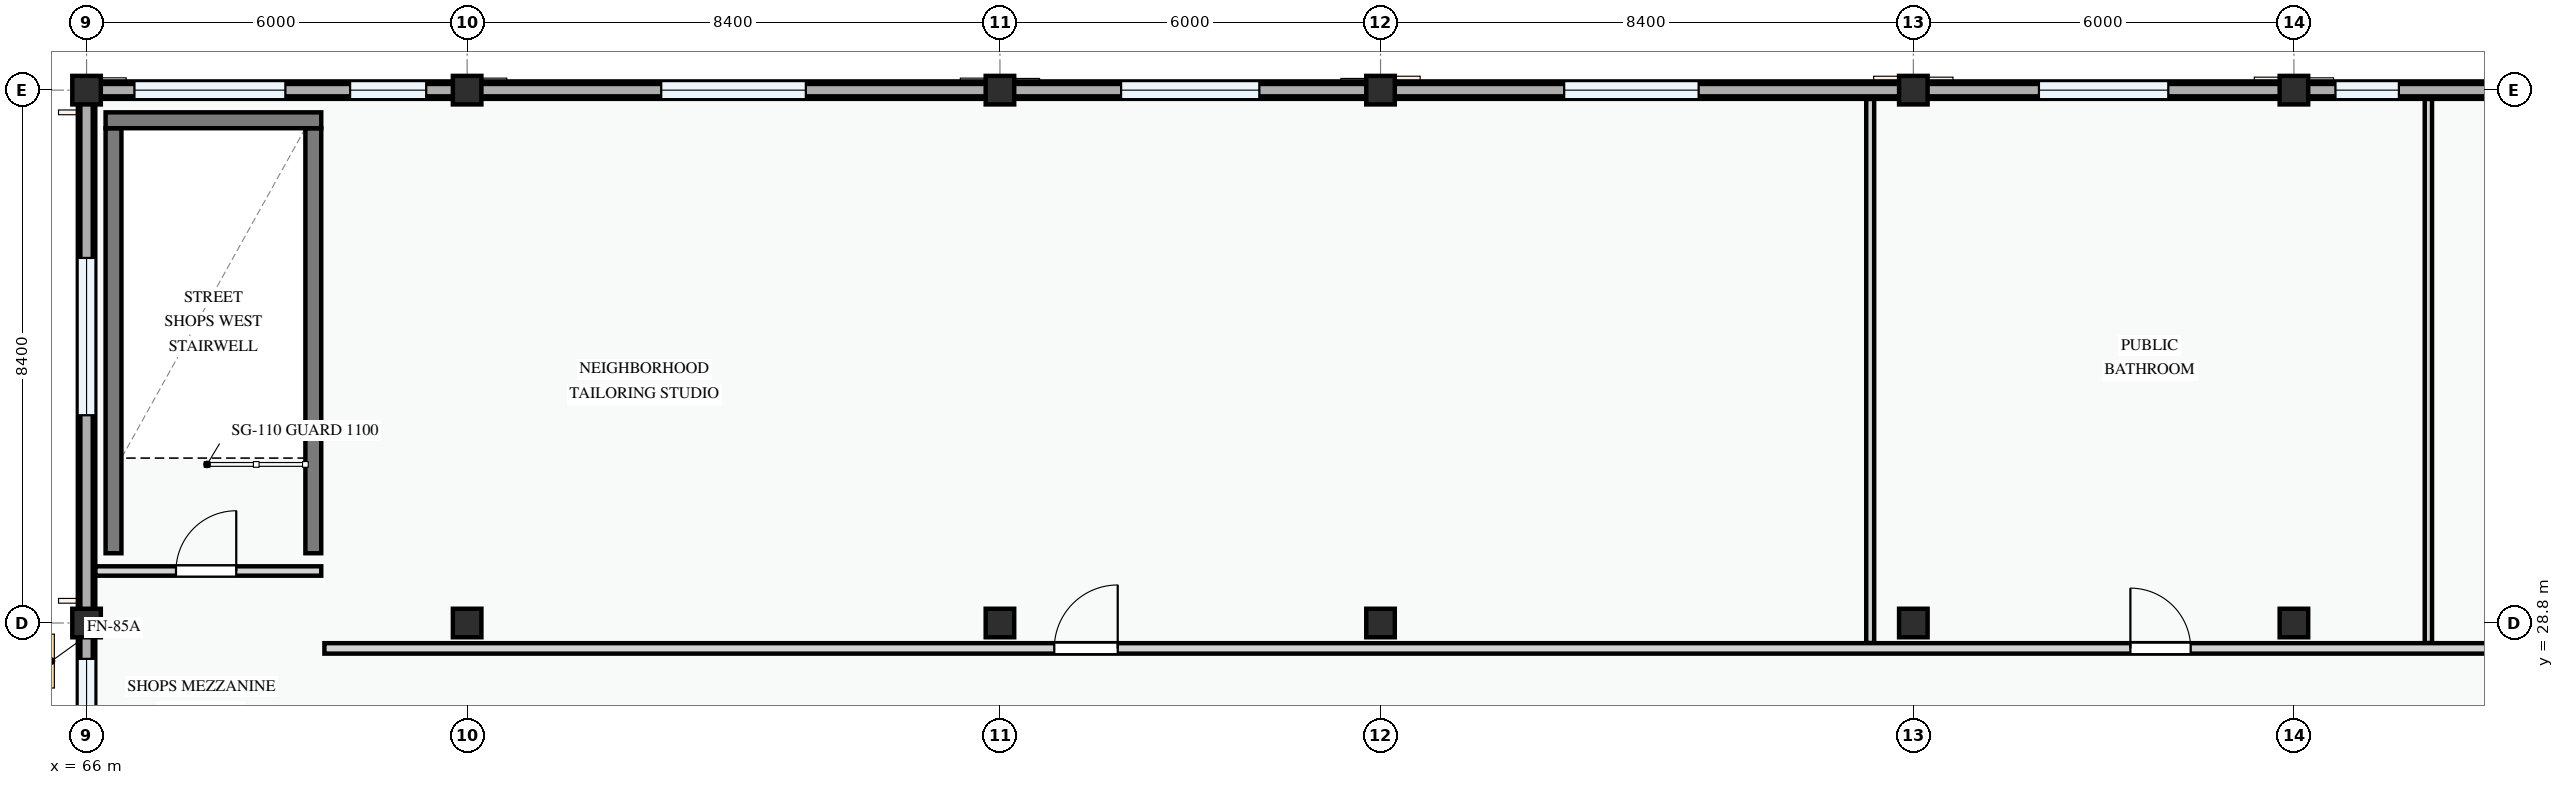
"""IFC4 building model, lengths in metres.
Left out: names, types, materials, properties, quantities, classifications, styles, units other than length and angle.
Written with IfcOpenShell. Run it as: python <this file> out.ifc"""

import sys

from ifc_helpers import new_model, si_unit, direction, frame, frame_2d, origin, origin_2d, place, context, subcontext, project, spatial, rectangle, extrude, element, fill, save


model = new_model("IFC4")
c1 = context("Model", 3, precision=1e-05, world=origin(), true_north=direction((0.0, 1.0)))
c2 = subcontext(c1, "Body", "Model", "MODEL_VIEW")
j1 = project(units=[si_unit("LENGTHUNIT", "METRE"), si_unit("PLANEANGLEUNIT", "RADIAN")], contexts=[c1])
p1 = place(None, origin())
s1 = spatial("IfcSite", under=j1, at=p1, CompositionType="ELEMENT")
p2 = place(p1, origin())
s2 = spatial("IfcBuilding", under=s1, at=p2, CompositionType="ELEMENT")
p3 = place(p2, frame((0.0, 0.0, 4.5)))
s3 = spatial("IfcBuildingStorey", under=s2, at=p3, CompositionType="ELEMENT", Elevation=4.5)
for number, where, z_axis, x_axis in (
    (1, (66.0, 28.8, 0.0), (0.0, 0.0, 1.0), (1.0, 0.0, 0.0)),
    (2, (66.0, 37.2, 0.0), (0.0, 0.0, 1.0), (1.0, 0.0, 0.0)),
    (3, (72.0, 28.8, 0.0), (0.0, 0.0, 1.0), (1.0, 0.0, 0.0)),
    (4, (72.0, 37.2, 0.0), (0.0, 0.0, 1.0), (1.0, 0.0, 0.0)),
    (5, (80.4, 28.8, 0.0), (0.0, 0.0, 1.0), (1.0, 0.0, 0.0)),
    (6, (80.4, 37.2, 0.0), (0.0, 0.0, 1.0), (1.0, 0.0, 0.0)),
    (7, (86.4, 28.8, 0.0), (0.0, 0.0, 1.0), (1.0, 0.0, 0.0)),
    (8, (86.4, 37.2, 0.0), (0.0, 0.0, 1.0), (1.0, 0.0, 0.0)),
    (9, (94.8, 28.8, 0.0), (0.0, 0.0, 1.0), (1.0, 0.0, 0.0)),
    (10, (94.8, 37.2, 0.0), (0.0, 0.0, 1.0), (1.0, 0.0, 0.0)),
    (11, (100.8, 28.8, 0.0), (0.0, 0.0, 1.0), (1.0, 0.0, 0.0)),
    (12, (100.8, 37.2, 0.0), (0.0, 0.0, 1.0), (1.0, 0.0, 0.0)),
):
    element("IfcColumn", number, at=place(p3, frame(where, z_axis=z_axis, x_axis=x_axis)), inside=s3, PredefinedType="COLUMN", context=c2, shape_type="SweptSolid", body=[
        extrude(rectangle(XDim=0.45, YDim=0.45, at=origin_2d()), origin(), (0.0, 0.0, 1.0), 3.6),
    ])
p4 = place(p3, frame((109.2, 37.2, 0.0), z_axis=(0.0, 0.0, 1.0), x_axis=(-1.0, 0.0, 0.0)))
e13 = element("IfcWall", 13, at=p4, inside=s3, PredefinedType="STANDARD", context=c2, shape_type="SweptSolid", body=[
    extrude(rectangle(XDim=8.4, YDim=0.275, at=frame_2d((4.2, 0.0))), origin(), (0.0, 0.0, 1.0), 2.675),
])
p5 = place(p4, frame((2.275, 0.0, 0.8)))
e14 = element("IfcOpeningElement", 14, at=p5, cuts=e13, PredefinedType="OPENING", context=c2, shape_type="SweptSolid", body=[
    extrude(rectangle(XDim=1.92, YDim=1.44, at=frame_2d((0.96, 0.72))), frame((0.0, 0.147, 0.0), z_axis=(0.0, -1.0, 0.0), x_axis=(1.0, 0.0, 0.0)), (0.0, 0.0, 1.0), 0.295),
])
p6 = place(p4, frame((6.745, 0.0, 0.8)))
e15 = element("IfcOpeningElement", 15, at=p6, cuts=e13, PredefinedType="OPENING", context=c2, shape_type="SweptSolid", body=[
    extrude(rectangle(XDim=1.0, YDim=1.25, at=frame_2d((0.5, 0.625))), frame((0.0, 0.147, 0.0), z_axis=(0.0, -1.0, 0.0), x_axis=(1.0, 0.0, 0.0)), (0.0, 0.0, 1.0), 0.295),
])
p7 = place(p3, frame((100.8, 37.2, 0.0), z_axis=(0.0, 0.0, 1.0), x_axis=(-1.0, 0.0, 0.0)))
e16 = element("IfcWall", 16, at=p7, inside=s3, PredefinedType="STANDARD", context=c2, shape_type="SweptSolid", body=[
    extrude(rectangle(XDim=6.0, YDim=0.275, at=frame_2d((3.0, 0.0))), origin(), (0.0, 0.0, 1.0), 2.775),
])
p8 = place(p7, frame((1.98, 0.0, 0.8)))
e17 = element("IfcOpeningElement", 17, at=p8, cuts=e16, PredefinedType="OPENING", context=c2, shape_type="SweptSolid", body=[
    extrude(rectangle(XDim=2.04, YDim=1.46, at=frame_2d((1.02, 0.73))), frame((0.0, 0.147, 0.0), z_axis=(0.0, -1.0, 0.0), x_axis=(1.0, 0.0, 0.0)), (0.0, 0.0, 1.0), 0.295),
])
p9 = place(p3, frame((94.8, 37.2, 0.0), z_axis=(0.0, 0.0, 1.0), x_axis=(-1.0, 0.0, 0.0)))
e18 = element("IfcWall", 18, at=p9, inside=s3, PredefinedType="STANDARD", context=c2, shape_type="SweptSolid", body=[
    extrude(rectangle(XDim=8.4, YDim=0.275, at=frame_2d((4.2, 0.0))), origin(), (0.0, 0.0, 1.0), 2.675),
])
p10 = place(p9, frame((3.385, 0.0, 0.8)))
e19 = element("IfcOpeningElement", 19, at=p10, cuts=e18, PredefinedType="OPENING", context=c2, shape_type="SweptSolid", body=[
    extrude(rectangle(XDim=2.12, YDim=1.44, at=frame_2d((1.06, 0.72))), frame((0.0, 0.147, 0.0), z_axis=(0.0, -1.0, 0.0), x_axis=(1.0, 0.0, 0.0)), (0.0, 0.0, 1.0), 0.295),
])
p11 = place(p3, frame((86.4, 37.2, 0.0), z_axis=(0.0, 0.0, 1.0), x_axis=(-1.0, 0.0, 0.0)))
e20 = element("IfcWall", 20, at=p11, inside=s3, PredefinedType="STANDARD", context=c2, shape_type="SweptSolid", body=[
    extrude(rectangle(XDim=6.0, YDim=0.275, at=frame_2d((3.0, 0.0))), origin(), (0.0, 0.0, 1.0), 2.775),
])
p12 = place(p11, frame((1.91, 0.0, 0.8)))
e21 = element("IfcOpeningElement", 21, at=p12, cuts=e20, PredefinedType="OPENING", context=c2, shape_type="SweptSolid", body=[
    extrude(rectangle(XDim=2.18, YDim=1.48, at=frame_2d((1.09, 0.74))), frame((0.0, 0.147, 0.0), z_axis=(0.0, -1.0, 0.0), x_axis=(1.0, 0.0, 0.0)), (0.0, 0.0, 1.0), 0.295),
])
p13 = place(p3, frame((80.4, 37.2, 0.0), z_axis=(0.0, 0.0, 1.0), x_axis=(-1.0, 0.0, 0.0)))
e22 = element("IfcWall", 22, at=p13, inside=s3, PredefinedType="STANDARD", context=c2, shape_type="SweptSolid", body=[
    extrude(rectangle(XDim=8.4, YDim=0.275, at=frame_2d((4.2, 0.0))), origin(), (0.0, 0.0, 1.0), 2.675),
])
p14 = place(p13, frame((3.06, 0.0, 0.8)))
e23 = element("IfcOpeningElement", 23, at=p14, cuts=e22, PredefinedType="OPENING", context=c2, shape_type="SweptSolid", body=[
    extrude(rectangle(XDim=2.28, YDim=1.46, at=frame_2d((1.14, 0.73))), frame((0.0, 0.147, 0.0), z_axis=(0.0, -1.0, 0.0), x_axis=(1.0, 0.0, 0.0)), (0.0, 0.0, 1.0), 0.295),
])
p15 = place(p3, frame((72.0, 37.2, 0.0), z_axis=(0.0, 0.0, 1.0), x_axis=(-1.0, 0.0, 0.0)))
e24 = element("IfcWall", 24, at=p15, inside=s3, PredefinedType="STANDARD", context=c2, shape_type="SweptSolid", body=[
    extrude(rectangle(XDim=6.0, YDim=0.275, at=frame_2d((3.0, 0.0))), origin(), (0.0, 0.0, 1.0), 2.775),
])
p16 = place(p15, frame((0.645, 0.0, 0.8)))
e25 = element("IfcOpeningElement", 25, at=p16, cuts=e24, PredefinedType="OPENING", context=c2, shape_type="SweptSolid", body=[
    extrude(rectangle(XDim=1.2, YDim=1.35, at=frame_2d((0.6, 0.675))), frame((0.0, 0.147, 0.0), z_axis=(0.0, -1.0, 0.0), x_axis=(1.0, 0.0, 0.0)), (0.0, 0.0, 1.0), 0.295),
])
p17 = place(p15, frame((2.865, 0.0, 0.8)))
e26 = element("IfcOpeningElement", 26, at=p17, cuts=e24, PredefinedType="OPENING", context=c2, shape_type="SweptSolid", body=[
    extrude(rectangle(XDim=2.38, YDim=1.48, at=frame_2d((1.19, 0.74))), frame((0.0, 0.147, 0.0), z_axis=(0.0, -1.0, 0.0), x_axis=(1.0, 0.0, 0.0)), (0.0, 0.0, 1.0), 0.295),
])
p18 = place(p3, frame((66.0, 37.2, 0.0), z_axis=(0.0, 0.0, 1.0), x_axis=(0.0, -1.0, 0.0)))
e27 = element("IfcWall", 27, at=p18, inside=s3, PredefinedType="STANDARD", context=c2, shape_type="SweptSolid", body=[
    extrude(rectangle(XDim=8.4, YDim=0.275, at=frame_2d((4.2, 0.0))), origin(), (0.0, 0.0, 1.0), 2.725),
])
p19 = place(p18, frame((2.645, 0.0, 0.8)))
e28 = element("IfcOpeningElement", 28, at=p19, cuts=e27, PredefinedType="OPENING", context=c2, shape_type="SweptSolid", body=[
    extrude(rectangle(XDim=2.48, YDim=1.46, at=frame_2d((1.24, 0.73))), frame((0.0, 0.147, 0.0), z_axis=(0.0, -1.0, 0.0), x_axis=(1.0, 0.0, 0.0)), (0.0, 0.0, 1.0), 0.295),
])
p20 = place(p3, frame((66.0, 28.8, 0.0), z_axis=(0.0, 0.0, 1.0), x_axis=(0.0, -1.0, 0.0)))
e29 = element("IfcWall", 29, at=p20, inside=s3, PredefinedType="STANDARD", context=c2, shape_type="SweptSolid", body=[
    extrude(rectangle(XDim=6.0, YDim=0.275, at=frame_2d((3.0, 0.0))), origin(), (0.0, 0.0, 1.0), 2.875),
])
p21 = place(p20, frame((0.565, 0.0, 0.8)))
e30 = element("IfcOpeningElement", 30, at=p21, cuts=e29, PredefinedType="OPENING", context=c2, shape_type="SweptSolid", body=[
    extrude(rectangle(XDim=1.68, YDim=1.46, at=frame_2d((0.84, 0.73))), frame((0.0, 0.147, 0.0), z_axis=(0.0, -1.0, 0.0), x_axis=(1.0, 0.0, 0.0)), (0.0, 0.0, 1.0), 0.295),
])
p22 = place(p20, frame((3.125, 0.0, 0.8)))
e31 = element("IfcOpeningElement", 31, at=p22, cuts=e29, PredefinedType="OPENING", context=c2, shape_type="SweptSolid", body=[
    extrude(rectangle(XDim=2.18, YDim=1.48, at=frame_2d((1.09, 0.74))), frame((0.0, 0.147, 0.0), z_axis=(0.0, -1.0, 0.0), x_axis=(1.0, 0.0, 0.0)), (0.0, 0.0, 1.0), 0.295),
])
p23 = place(p3, frame((115.2, 37.2, 3.6), z_axis=(0.0, 0.0, 1.0), x_axis=(-1.0, 0.0, 0.0)))
e32 = element("IfcWall", 32, at=p23, inside=s3, PredefinedType="PARAPET", context=c2, shape_type="SweptSolid", body=[
    extrude(rectangle(XDim=49.2, YDim=0.195, at=frame_2d((24.6, 0.0))), origin(), (0.0, 0.0, 1.0), 1.15),
])
p24 = place(p3, frame((66.0, 37.2, 3.6), z_axis=(0.0, 0.0, 1.0), x_axis=(0.0, -1.0, 0.0)))
e33 = element("IfcWall", 33, at=p24, inside=s3, PredefinedType="PARAPET", context=c2, shape_type="SweptSolid", body=[
    extrude(rectangle(XDim=14.4, YDim=0.195, at=frame_2d((7.2, 0.0))), origin(), (0.0, 0.0, 1.0), 1.15),
])
for number, where, z_axis, x_axis in (
    (34, (69.575, 29.9, 0.0), (0.0, 0.0, 1.0), (0.0, 1.0, 0.0)),
    (35, (66.425, 29.9, 0.0), (0.0, 0.0, 1.0), (0.0, 1.0, 0.0)),
):
    element("IfcWall", number, at=place(p3, frame(where, z_axis=z_axis, x_axis=x_axis)), inside=s3, PredefinedType="SHEAR", context=c2, shape_type="SweptSolid", body=[
        extrude(rectangle(XDim=6.7, YDim=0.25, at=frame_2d((3.35, 0.0))), origin(), (0.0, 0.0, 1.0), 3.3),
    ])
p25 = place(p3, frame((69.7, 36.725, 0.0), z_axis=(0.0, 0.0, 1.0), x_axis=(-1.0, 0.0, 0.0)))
e36 = element("IfcWall", 36, at=p25, inside=s3, PredefinedType="SHEAR", context=c2, shape_type="SweptSolid", body=[
    extrude(rectangle(XDim=3.4, YDim=0.25, at=frame_2d((1.7, 0.0))), origin(), (0.0, 0.0, 1.0), 3.3),
])
p26 = place(p3, frame((94.12, 28.485, 0.0), z_axis=(0.0, 0.0, 1.0), x_axis=(0.0, 1.0, 0.0)))
e37 = element("IfcWall", 37, at=p26, inside=s3, PredefinedType="PARTITIONING", context=c2, shape_type="SweptSolid", body=[
    extrude(rectangle(XDim=8.576, YDim=0.125, at=frame_2d((4.288, 0.0))), origin(), (0.0, 0.0, 1.0), 3.3),
])
p27 = place(p3, frame((102.92, 28.485, 0.0), z_axis=(0.0, 0.0, 1.0), x_axis=(0.0, 1.0, 0.0)))
e38 = element("IfcWall", 38, at=p27, inside=s3, PredefinedType="PARTITIONING", context=c2, shape_type="SweptSolid", body=[
    extrude(rectangle(XDim=8.576, YDim=0.115, at=frame_2d((4.288, 0.0))), origin(), (0.0, 0.0, 1.0), 3.3),
])
p28 = place(p3, frame((66.139, 29.62, 0.0), z_axis=(0.0, 0.0, 1.0), x_axis=(1.0, 0.0, 0.0)))
e39 = element("IfcWall", 39, at=p28, inside=s3, PredefinedType="PARTITIONING", context=c2, shape_type="SweptSolid", body=[
    extrude(rectangle(XDim=3.561, YDim=0.148, at=frame_2d((1.78, 0.0))), origin(), (0.0, 0.0, 1.0), 3.3),
])
p29 = place(p28, frame((1.271, 0.0, 0.0)))
e40 = element("IfcOpeningElement", 40, at=p29, cuts=e39, PredefinedType="OPENING", context=c2, shape_type="SweptSolid", body=[
    extrude(rectangle(XDim=0.95, YDim=2.1, at=frame_2d((0.475, 1.05))), frame((0.0, 0.084, 0.0), z_axis=(0.0, -1.0, 0.0), x_axis=(1.0, 0.0, 0.0)), (0.0, 0.0, 1.0), 0.168),
])
p30 = place(p3, frame((69.75, 28.4, 0.0), z_axis=(0.0, 0.0, 1.0), x_axis=(1.0, 0.0, 0.0)))
e41 = element("IfcWall", 41, at=p30, inside=s3, PredefinedType="PARTITIONING", context=c2, shape_type="SweptSolid", body=[
    extrude(rectangle(XDim=41.75, YDim=0.165, at=frame_2d((20.875, 0.0))), origin(), (0.0, 0.0, 1.0), 2.675),
])
p31 = place(p30, frame((11.507, 0.0, 0.0)))
e42 = element("IfcOpeningElement", 42, at=p31, cuts=e41, PredefinedType="OPENING", context=c2, shape_type="SweptSolid", body=[
    extrude(rectangle(XDim=1.0, YDim=2.1, at=frame_2d((0.5, 1.05))), frame((0.0, 0.093, 0.0), z_axis=(0.0, -1.0, 0.0), x_axis=(1.0, 0.0, 0.0)), (0.0, 0.0, 1.0), 0.185),
])
p32 = place(p30, frame((28.472, 0.0, 0.0)))
e43 = element("IfcOpeningElement", 43, at=p32, cuts=e41, PredefinedType="OPENING", context=c2, shape_type="SweptSolid", body=[
    extrude(rectangle(XDim=0.95, YDim=2.1, at=frame_2d((0.475, 1.05))), frame((0.0, 0.093, 0.0), z_axis=(0.0, -1.0, 0.0), x_axis=(1.0, 0.0, 0.0)), (0.0, 0.0, 1.0), 0.185),
])
p33 = place(p30, frame((36.544, 0.0, 0.0)))
e44 = element("IfcOpeningElement", 44, at=p33, cuts=e41, PredefinedType="OPENING", context=c2, shape_type="SweptSolid", body=[
    extrude(rectangle(XDim=0.95, YDim=2.1, at=frame_2d((0.475, 1.05))), frame((0.0, 0.093, 0.0), z_axis=(0.0, -1.0, 0.0), x_axis=(1.0, 0.0, 0.0)), (0.0, 0.0, 1.0), 0.185),
])
p34 = place(p6, origin())
e45 = element("IfcWindow", 45, at=p34, inside=s3, PartitioningType="SINGLE_PANEL", PredefinedType="WINDOW", context=c2, shape_type="SweptSolid", body=[
    extrude(rectangle(XDim=1.0, YDim=1.25, at=frame_2d((0.5, 0.625))), frame((0.0, 0.03, 0.0), z_axis=(0.0, -1.0, 0.0), x_axis=(1.0, 0.0, 0.0)), (0.0, 0.0, 1.0), 0.06),
])
fill(e15, e45)
p35 = place(p8, origin())
e46 = element("IfcWindow", 46, at=p35, inside=s3, PartitioningType="DOUBLE_PANEL_VERTICAL", PredefinedType="WINDOW", context=c2, shape_type="SweptSolid", body=[
    extrude(rectangle(XDim=2.04, YDim=1.46, at=frame_2d((1.02, 0.73))), frame((0.0, 0.03, 0.0), z_axis=(0.0, -1.0, 0.0), x_axis=(1.0, 0.0, 0.0)), (0.0, 0.0, 1.0), 0.06),
])
fill(e17, e46)
p36 = place(p10, origin())
e47 = element("IfcWindow", 47, at=p36, inside=s3, PartitioningType="DOUBLE_PANEL_VERTICAL", PredefinedType="WINDOW", context=c2, shape_type="SweptSolid", body=[
    extrude(rectangle(XDim=2.12, YDim=1.44, at=frame_2d((1.06, 0.72))), frame((0.0, 0.03, 0.0), z_axis=(0.0, -1.0, 0.0), x_axis=(1.0, 0.0, 0.0)), (0.0, 0.0, 1.0), 0.06),
])
fill(e19, e47)
p37 = place(p12, origin())
e48 = element("IfcWindow", 48, at=p37, inside=s3, PartitioningType="DOUBLE_PANEL_VERTICAL", PredefinedType="WINDOW", context=c2, shape_type="SweptSolid", body=[
    extrude(rectangle(XDim=2.18, YDim=1.48, at=frame_2d((1.09, 0.74))), frame((0.0, 0.03, 0.0), z_axis=(0.0, -1.0, 0.0), x_axis=(1.0, 0.0, 0.0)), (0.0, 0.0, 1.0), 0.06),
])
fill(e21, e48)
p38 = place(p14, origin())
e49 = element("IfcWindow", 49, at=p38, inside=s3, PartitioningType="DOUBLE_PANEL_VERTICAL", PredefinedType="WINDOW", context=c2, shape_type="SweptSolid", body=[
    extrude(rectangle(XDim=2.28, YDim=1.46, at=frame_2d((1.14, 0.73))), frame((0.0, 0.03, 0.0), z_axis=(0.0, -1.0, 0.0), x_axis=(1.0, 0.0, 0.0)), (0.0, 0.0, 1.0), 0.06),
])
fill(e23, e49)
p39 = place(p16, origin())
e50 = element("IfcWindow", 50, at=p39, inside=s3, PartitioningType="SINGLE_PANEL", PredefinedType="WINDOW", context=c2, shape_type="SweptSolid", body=[
    extrude(rectangle(XDim=1.2, YDim=1.35, at=frame_2d((0.6, 0.675))), frame((0.0, 0.03, 0.0), z_axis=(0.0, -1.0, 0.0), x_axis=(1.0, 0.0, 0.0)), (0.0, 0.0, 1.0), 0.06),
])
fill(e25, e50)
p40 = place(p17, origin())
e51 = element("IfcWindow", 51, at=p40, inside=s3, PartitioningType="DOUBLE_PANEL_VERTICAL", PredefinedType="WINDOW", context=c2, shape_type="SweptSolid", body=[
    extrude(rectangle(XDim=2.38, YDim=1.48, at=frame_2d((1.19, 0.74))), frame((0.0, 0.03, 0.0), z_axis=(0.0, -1.0, 0.0), x_axis=(1.0, 0.0, 0.0)), (0.0, 0.0, 1.0), 0.06),
])
fill(e26, e51)
p41 = place(p19, origin())
e52 = element("IfcWindow", 52, at=p41, inside=s3, PartitioningType="DOUBLE_PANEL_VERTICAL", PredefinedType="WINDOW", context=c2, shape_type="SweptSolid", body=[
    extrude(rectangle(XDim=2.48, YDim=1.46, at=frame_2d((1.24, 0.73))), frame((0.0, 0.03, 0.0), z_axis=(0.0, -1.0, 0.0), x_axis=(1.0, 0.0, 0.0)), (0.0, 0.0, 1.0), 0.06),
])
fill(e28, e52)
p42 = place(p21, origin())
e53 = element("IfcWindow", 53, at=p42, inside=s3, PartitioningType="DOUBLE_PANEL_VERTICAL", PredefinedType="WINDOW", context=c2, shape_type="SweptSolid", body=[
    extrude(rectangle(XDim=1.68, YDim=1.46, at=frame_2d((0.84, 0.73))), frame((0.0, 0.03, 0.0), z_axis=(0.0, -1.0, 0.0), x_axis=(1.0, 0.0, 0.0)), (0.0, 0.0, 1.0), 0.06),
])
fill(e30, e53)
p43 = place(p29, origin())
e54 = element("IfcDoor", 54, at=p43, inside=s3, OperationType="SINGLE_SWING_RIGHT", PredefinedType="DOOR", context=c2, shape_type="SweptSolid", body=[
    extrude(rectangle(XDim=0.95, YDim=2.1, at=frame_2d((0.475, 1.05))), frame((0.0, 0.025, 0.0), z_axis=(0.0, -1.0, 0.0), x_axis=(1.0, 0.0, 0.0)), (0.0, 0.0, 1.0), 0.05),
])
fill(e40, e54)
p44 = place(p31, origin())
e55 = element("IfcDoor", 55, at=p44, inside=s3, OperationType="SINGLE_SWING_RIGHT", PredefinedType="DOOR", context=c2, shape_type="SweptSolid", body=[
    extrude(rectangle(XDim=1.0, YDim=2.1, at=frame_2d((0.5, 1.05))), frame((0.0, 0.025, 0.0), z_axis=(0.0, -1.0, 0.0), x_axis=(1.0, 0.0, 0.0)), (0.0, 0.0, 1.0), 0.05),
])
fill(e42, e55)
p45 = place(p32, origin())
e56 = element("IfcDoor", 56, at=p45, inside=s3, OperationType="SINGLE_SWING_LEFT", PredefinedType="DOOR", context=c2, shape_type="SweptSolid", body=[
    extrude(rectangle(XDim=0.95, YDim=2.1, at=frame_2d((0.475, 1.05))), frame((0.0, 0.025, 0.0), z_axis=(0.0, -1.0, 0.0), x_axis=(1.0, 0.0, 0.0)), (0.0, 0.0, 1.0), 0.05),
])
fill(e43, e56)
save(model, sys.argv[1])
